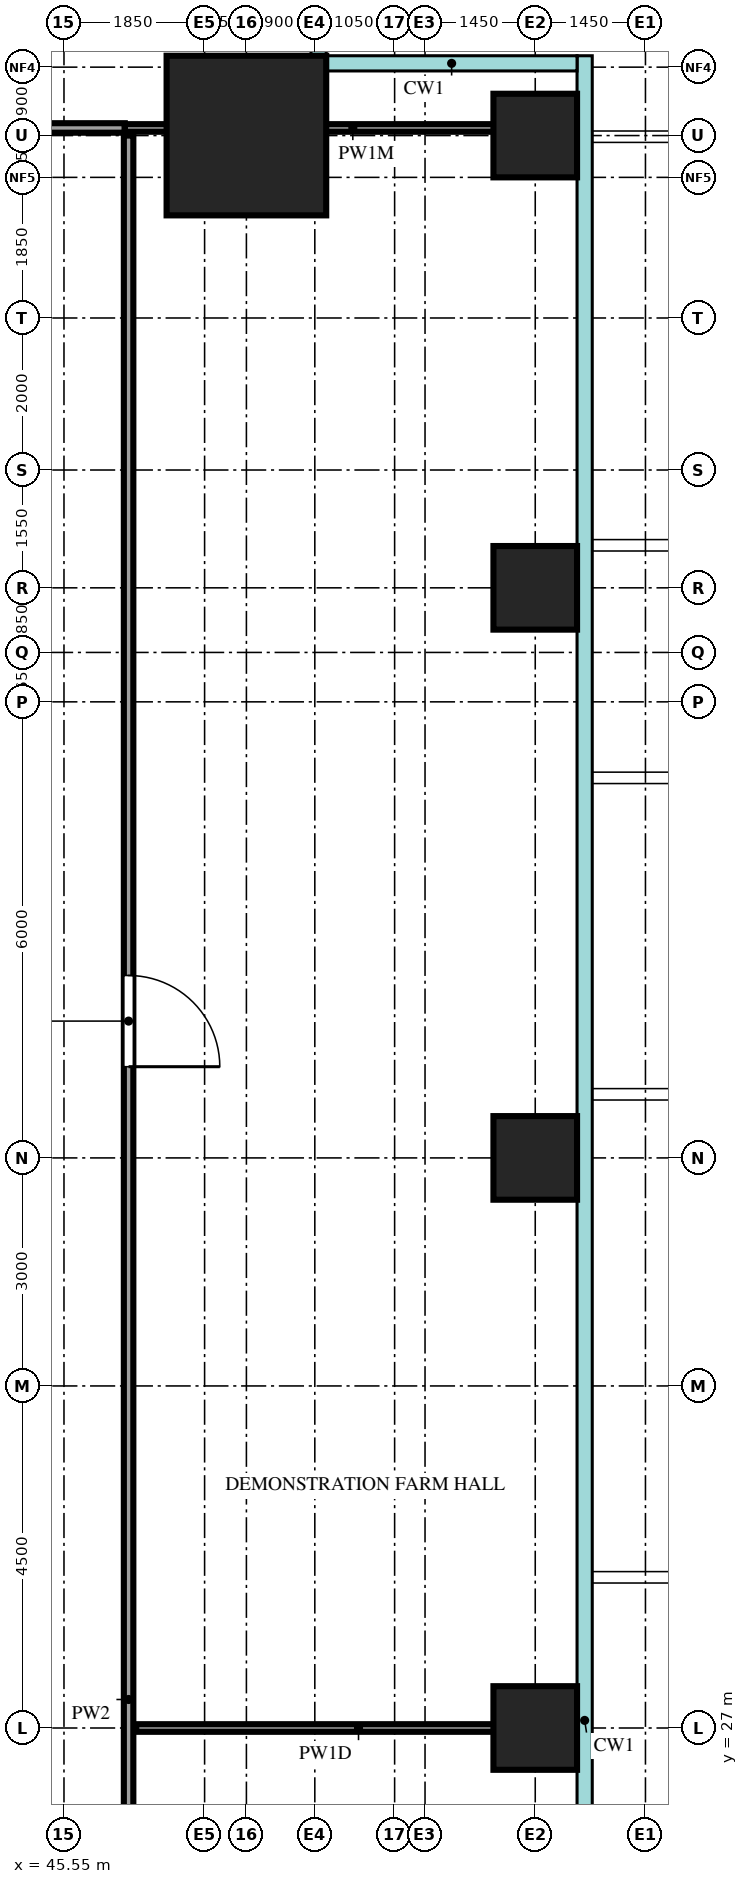
"""IFC4 building model, lengths in metres.
Left out: names, types, materials, properties, quantities, classifications, styles, units other than length and angle.
Written with IfcOpenShell. Run it as: python <this file> out.ifc"""

import sys

from ifc_helpers import new_model, si_unit, direction, frame, frame_2d, origin, origin_2d, place, context, subcontext, project, spatial, rectangle, extrude, source, transform, mapped, element, fill, save


model = new_model("IFC4")
c1 = context("Model", 3, precision=1e-05, world=origin(), true_north=direction((0.0, 1.0)))
c2 = subcontext(c1, "Body", "Model", "MODEL_VIEW")
j1 = project(units=[si_unit("LENGTHUNIT", "METRE"), si_unit("PLANEANGLEUNIT", "RADIAN")], contexts=[c1])
p1 = place(None, origin())
s1 = spatial("IfcSite", under=j1, at=p1, CompositionType="ELEMENT")
p2 = place(p1, origin())
s2 = spatial("IfcBuilding", under=s1, at=p2, CompositionType="ELEMENT")
p3 = place(p2, frame((0.0, 0.0, 149.9)))
s3 = spatial("IfcBuildingStorey", under=s2, at=p3, CompositionType="ELEMENT", Elevation=149.9)
m1 = source(origin(), c2, "Body", "SweptSolid", [
    extrude(rectangle(XDim=2.1, YDim=2.1, at=origin_2d()), origin(), (0.0, 0.0, 1.0), 4.4),
])
p4 = place(p3, frame((47.95, 47.95, 0.0), z_axis=(0.0, 0.0, 1.0), x_axis=(1.0, 0.0, 0.0)))
e1 = element("IfcColumn", 1, at=p4, inside=s3, PredefinedType="COLUMN", context=c2, shape_type="MappedRepresentation", body=[
    mapped(m1, transform((0.0, 0.0, 0.0))),
])
m2 = source(origin(), c2, "Body", "SweptSolid", [
    extrude(rectangle(XDim=1.1, YDim=1.1, at=origin_2d()), origin(), (0.0, 0.0, 1.0), 4.1),
])
for number, where, z_axis, x_axis in (
    (2, (51.75, 27.0, 0.0), (0.0, 0.0, 1.0), (1.0, 0.0, 0.0)),
    (3, (51.75, 34.5, 0.0), (0.0, 0.0, 1.0), (1.0, 0.0, 0.0)),
    (4, (51.75, 42.0, 0.0), (0.0, 0.0, 1.0), (1.0, 0.0, 0.0)),
    (5, (51.75, 47.95, 0.0), (0.0, 0.0, 1.0), (1.0, 0.0, 0.0)),
):
    element("IfcColumn", number, at=place(p3, frame(where, z_axis=z_axis, x_axis=x_axis)), inside=s3, PredefinedType="COLUMN", context=c2, shape_type="MappedRepresentation", body=[
        mapped(m2, transform((0.0, 0.0, 0.0))),
    ])
m3 = source(origin(), c2, "Body", "SweptSolid", [
    extrude(rectangle(XDim=37.65, YDim=0.125, at=frame_2d((18.825, 0.0))), origin(), (0.0, 0.0, 1.0), 4.2),
])
p5 = place(p3, frame((46.4, 10.3, 0.0), z_axis=(0.0, 0.0, 1.0), x_axis=(0.0, 1.0, 0.0)))
e6 = element("IfcWall", 6, at=p5, inside=s3, PredefinedType="PARTITIONING", context=c2, shape_type="MappedRepresentation", body=[
    mapped(m3, transform((0.0, 0.0, 0.0))),
])
m4 = source(origin(), c2, "Body", "SweptSolid", [
    extrude(rectangle(XDim=0.9, YDim=2.1, at=frame_2d((0.45, 1.05))), frame((0.0, 0.073, 0.0), z_axis=(0.0, -1.0, 0.0), x_axis=(1.0, 0.0, 0.0)), (0.0, 0.0, 1.0), 0.145),
])
p6 = place(p5, frame((7.85, 0.0, 0.0)))
e7 = element("IfcOpeningElement", 7, at=p6, cuts=e6, PredefinedType="OPENING", context=c2, shape_type="MappedRepresentation", body=[
    mapped(m4, transform((0.0, 0.0, 0.0))),
])
m5 = source(origin(), c2, "Body", "SweptSolid", [
    extrude(rectangle(XDim=1.2, YDim=2.1, at=frame_2d((0.6, 1.05))), frame((0.0, 0.073, 0.0), z_axis=(0.0, -1.0, 0.0), x_axis=(1.0, 0.0, 0.0)), (0.0, 0.0, 1.0), 0.145),
])
p7 = place(p5, frame((25.4, 0.0, 0.0)))
e8 = element("IfcOpeningElement", 8, at=p7, cuts=e6, PredefinedType="OPENING", context=c2, shape_type="MappedRepresentation", body=[
    mapped(m5, transform((0.0, 0.0, 0.0))),
])
m6 = source(origin(), c2, "Body", "SweptSolid", [
    extrude(rectangle(XDim=5.85, YDim=0.1, at=frame_2d((2.925, 0.0))), origin(), (0.0, 0.0, 1.0), 4.2),
])
p8 = place(p3, frame((46.5, 27.0, 0.0), z_axis=(0.0, 0.0, 1.0), x_axis=(1.0, 0.0, 0.0)))
e9 = element("IfcWall", 9, at=p8, inside=s3, PredefinedType="PARTITIONING", context=c2, shape_type="MappedRepresentation", body=[
    mapped(m6, transform((0.0, 0.0, 0.0))),
])
m7 = source(origin(), c2, "Body", "SweptSolid", [
    extrude(rectangle(XDim=42.2, YDim=0.125, at=frame_2d((21.1, 0.0))), origin(), (0.0, 0.0, 1.0), 3.55),
])
p9 = place(p3, frame((4.15, 48.05, 0.0), z_axis=(0.0, 0.0, 1.0), x_axis=(1.0, 0.0, 0.0)))
e10 = element("IfcWall", 10, at=p9, inside=s3, PredefinedType="PARTITIONING", context=c2, shape_type="MappedRepresentation", body=[
    mapped(m7, transform((0.0, 0.0, 0.0))),
])
p10 = place(p9, frame((7.25, 0.0, 0.0)))
e11 = element("IfcOpeningElement", 11, at=p10, cuts=e10, PredefinedType="OPENING", context=c2, shape_type="MappedRepresentation", body=[
    mapped(m4, transform((0.0, 0.0, 0.0))),
])
p11 = place(p9, frame((22.55, 0.0, 0.0)))
e12 = element("IfcOpeningElement", 12, at=p11, cuts=e10, PredefinedType="OPENING", context=c2, shape_type="MappedRepresentation", body=[
    mapped(m4, transform((0.0, 0.0, 0.0))),
])
p12 = place(p9, frame((35.85, 0.0, 0.0)))
e13 = element("IfcOpeningElement", 13, at=p12, cuts=e10, PredefinedType="OPENING", context=c2, shape_type="MappedRepresentation", body=[
    mapped(m4, transform((0.0, 0.0, 0.0))),
])
m8 = source(origin(), c2, "Body", "SweptSolid", [
    extrude(rectangle(XDim=6.0, YDim=0.1, at=frame_2d((3.0, 0.0))), origin(), (0.0, 0.0, 1.0), 3.55),
])
p13 = place(p3, frame((46.35, 48.05, 0.0), z_axis=(0.0, 0.0, 1.0), x_axis=(1.0, 0.0, 0.0)))
e14 = element("IfcWall", 14, at=p13, inside=s3, PredefinedType="PARTITIONING", context=c2, shape_type="MappedRepresentation", body=[
    mapped(m8, transform((0.0, 0.0, 0.0))),
])
m9 = source(origin(), c2, "Body", "SweptSolid", [
    extrude(rectangle(XDim=1.2, YDim=2.1, at=frame_2d((0.6, 1.05))), frame((0.0, 0.025, 0.0), z_axis=(0.0, -1.0, 0.0), x_axis=(1.0, 0.0, 0.0)), (0.0, 0.0, 1.0), 0.05),
])
p14 = place(p7, origin())
e15 = element("IfcDoor", 15, at=p14, inside=s3, OperationType="SINGLE_SWING_LEFT", PredefinedType="DOOR", context=c2, shape_type="MappedRepresentation", body=[
    mapped(m9, transform((0.0, 0.0, 0.0))),
])
fill(e8, e15)
save(model, sys.argv[1])
